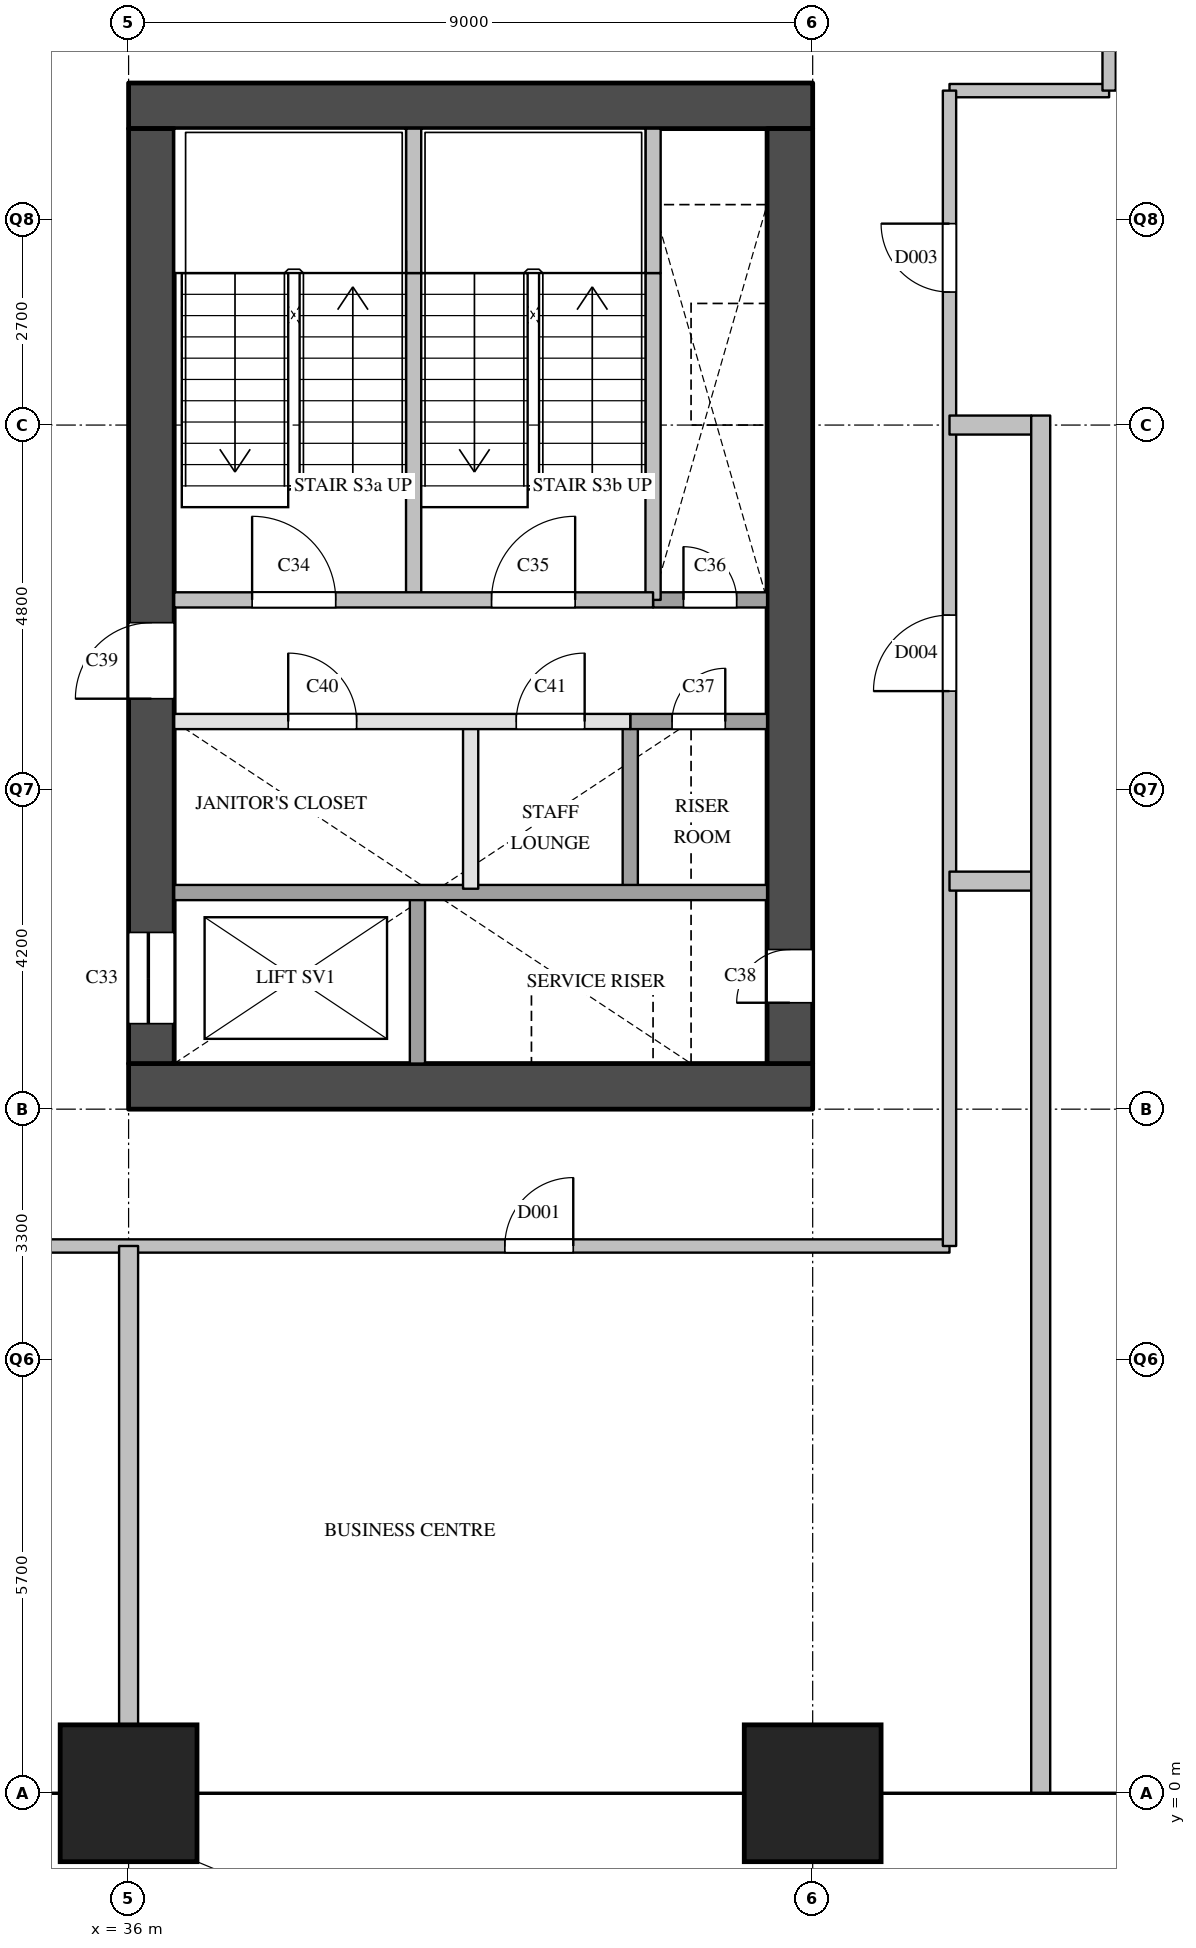
"""IFC4 building model, lengths in metres.
Left out: names, types, materials, properties, quantities, classifications, styles, units other than length and angle.
Written with IfcOpenShell. Run it as: python <this file> out.ifc"""

import sys

from ifc_helpers import new_model, si_unit, direction, frame, frame_2d, origin, origin_2d, place, context, subcontext, project, spatial, rectangle, extrude, element, fill, save


model = new_model("IFC4")
c1 = context("Model", 3, precision=1e-05, world=origin(), true_north=direction((0.0, 1.0)))
c2 = subcontext(c1, "Body", "Model", "MODEL_VIEW")
j1 = project(units=[si_unit("LENGTHUNIT", "METRE"), si_unit("PLANEANGLEUNIT", "RADIAN")], contexts=[c1])
p1 = place(None, origin())
s1 = spatial("IfcSite", under=j1, at=p1, CompositionType="ELEMENT")
p2 = place(p1, origin())
s2 = spatial("IfcBuilding", under=s1, at=p2, CompositionType="ELEMENT")
p3 = place(p2, frame((0.0, 0.0, 115.8)))
s3 = spatial("IfcBuildingStorey", under=s2, at=p3, CompositionType="ELEMENT", Elevation=115.8)
for number, where, z_axis, x_axis in (
    (1, (36.0, 0.0, 0.0), (0.0, 0.0, 1.0), (1.0, 0.0, 0.0)),
    (2, (45.0, 0.0, 0.0), (0.0, 0.0, 1.0), (1.0, 0.0, 0.0)),
):
    element("IfcColumn", number, at=place(p3, frame(where, z_axis=z_axis, x_axis=x_axis)), inside=s3, PredefinedType="COLUMN", context=c2, shape_type="SweptSolid", body=[
        extrude(rectangle(XDim=1.8, YDim=1.8, at=origin_2d()), origin(), (0.0, 0.0, 1.0), 3.8),
    ])
for number, where, z_axis, x_axis in (
    (3, (36.0, 9.3, 0.0), (0.0, 0.0, 1.0), (1.0, 0.0, 0.0)),
    (4, (36.0, 22.2, 0.0), (0.0, 0.0, 1.0), (1.0, 0.0, 0.0)),
):
    element("IfcWall", number, at=place(p3, frame(where, z_axis=z_axis, x_axis=x_axis)), inside=s3, PredefinedType="SHEAR", context=c2, shape_type="SweptSolid", body=[
        extrude(rectangle(XDim=9.0, YDim=0.6, at=frame_2d((4.5, 0.0))), origin(), (0.0, 0.0, 1.0), 3.5),
    ])
p4 = place(p3, frame((36.3, 9.6, 0.0), z_axis=(0.0, 0.0, 1.0), x_axis=(0.0, 1.0, 0.0)))
e5 = element("IfcWall", 5, at=p4, inside=s3, PredefinedType="SHEAR", context=c2, shape_type="SweptSolid", body=[
    extrude(rectangle(XDim=12.3, YDim=0.6, at=frame_2d((6.15, 0.0))), origin(), (0.0, 0.0, 1.0), 3.5),
])
p5 = place(p4, frame((0.525, 0.0, 0.0)))
e6 = element("IfcOpeningElement", 6, at=p5, cuts=e5, PredefinedType="OPENING", context=c2, shape_type="SweptSolid", body=[
    extrude(rectangle(XDim=1.2, YDim=2.1, at=frame_2d((0.6, 1.05))), frame((0.0, 0.31, 0.0), z_axis=(0.0, -1.0, 0.0), x_axis=(1.0, 0.0, 0.0)), (0.0, 0.0, 1.0), 0.62),
])
p6 = place(p4, frame((4.8, 0.0, 0.0)))
e7 = element("IfcOpeningElement", 7, at=p6, cuts=e5, PredefinedType="OPENING", context=c2, shape_type="SweptSolid", body=[
    extrude(rectangle(XDim=1.0, YDim=2.1, at=frame_2d((0.5, 1.05))), frame((0.0, 0.31, 0.0), z_axis=(0.0, -1.0, 0.0), x_axis=(1.0, 0.0, 0.0)), (0.0, 0.0, 1.0), 0.62),
])
p7 = place(p3, frame((44.7, 9.6, 0.0), z_axis=(0.0, 0.0, 1.0), x_axis=(0.0, 1.0, 0.0)))
e8 = element("IfcWall", 8, at=p7, inside=s3, PredefinedType="SHEAR", context=c2, shape_type="SweptSolid", body=[
    extrude(rectangle(XDim=12.3, YDim=0.6, at=frame_2d((6.15, 0.0))), origin(), (0.0, 0.0, 1.0), 3.5),
])
p8 = place(p7, frame((0.8, 0.0, 0.0)))
e9 = element("IfcOpeningElement", 9, at=p8, cuts=e8, PredefinedType="OPENING", context=c2, shape_type="SweptSolid", body=[
    extrude(rectangle(XDim=0.7, YDim=2.1, at=frame_2d((0.35, 1.05))), frame((0.0, 0.31, 0.0), z_axis=(0.0, -1.0, 0.0), x_axis=(1.0, 0.0, 0.0)), (0.0, 0.0, 1.0), 0.62),
])
p9 = place(p3, frame((39.75, 15.7, 0.0), z_axis=(0.0, 0.0, 1.0), x_axis=(0.0, 1.0, 0.0)))
e10 = element("IfcWall", 10, at=p9, inside=s3, PredefinedType="SOLIDWALL", context=c2, shape_type="SweptSolid", body=[
    extrude(rectangle(XDim=4.3, YDim=0.2, at=frame_2d((2.15, 0.0))), origin(), (0.0, 0.0, 1.0), 3.5),
])
p10 = place(p3, frame((39.75, 20.0, 0.0), z_axis=(0.0, 0.0, 1.0), x_axis=(0.0, 1.0, 0.0)))
e11 = element("IfcWall", 11, at=p10, inside=s3, PredefinedType="SOLIDWALL", context=c2, shape_type="SweptSolid", body=[
    extrude(rectangle(XDim=1.9, YDim=0.2, at=frame_2d((0.95, 0.0))), origin(), (0.0, 0.0, 1.0), 3.5),
])
p11 = place(p3, frame((39.8, 9.6, 0.0), z_axis=(0.0, 0.0, 1.0), x_axis=(0.0, 1.0, 0.0)))
e12 = element("IfcWall", 12, at=p11, inside=s3, PredefinedType="SOLIDWALL", context=c2, shape_type="SweptSolid", body=[
    extrude(rectangle(XDim=2.3, YDim=0.2, at=frame_2d((1.15, 0.0))), origin(), (0.0, 0.0, 1.0), 3.5),
])
p12 = place(p3, frame((40.5, 11.9, 0.0), z_axis=(0.0, 0.0, 1.0), x_axis=(0.0, 1.0, 0.0)))
e13 = element("IfcWall", 13, at=p12, inside=s3, PredefinedType="PARTITIONING", context=c2, shape_type="SweptSolid", body=[
    extrude(rectangle(XDim=2.2, YDim=0.2, at=frame_2d((1.1, 0.0))), origin(), (0.0, 0.0, 1.0), 3.5),
])
p13 = place(p3, frame((42.6, 11.9, 0.0), z_axis=(0.0, 0.0, 1.0), x_axis=(0.0, 1.0, 0.0)))
e14 = element("IfcWall", 14, at=p13, inside=s3, PredefinedType="SOLIDWALL", context=c2, shape_type="SweptSolid", body=[
    extrude(rectangle(XDim=2.2, YDim=0.2, at=frame_2d((1.1, 0.0))), origin(), (0.0, 0.0, 1.0), 3.5),
])
p14 = place(p3, frame((42.9, 15.7, 0.0), z_axis=(0.0, 0.0, 1.0), x_axis=(0.0, 1.0, 0.0)))
e15 = element("IfcWall", 15, at=p14, inside=s3, PredefinedType="SOLIDWALL", context=c2, shape_type="SweptSolid", body=[
    extrude(rectangle(XDim=4.3, YDim=0.2, at=frame_2d((2.15, 0.0))), origin(), (0.0, 0.0, 1.0), 3.5),
])
p15 = place(p3, frame((42.9, 20.0, 0.0), z_axis=(0.0, 0.0, 1.0), x_axis=(0.0, 1.0, 0.0)))
e16 = element("IfcWall", 16, at=p15, inside=s3, PredefinedType="SOLIDWALL", context=c2, shape_type="SweptSolid", body=[
    extrude(rectangle(XDim=1.9, YDim=0.2, at=frame_2d((0.95, 0.0))), origin(), (0.0, 0.0, 1.0), 3.5),
])
p16 = place(p3, frame((36.6, 11.85, 0.0), z_axis=(0.0, 0.0, 1.0), x_axis=(1.0, 0.0, 0.0)))
e17 = element("IfcWall", 17, at=p16, inside=s3, PredefinedType="SOLIDWALL", context=c2, shape_type="SweptSolid", body=[
    extrude(rectangle(XDim=7.8, YDim=0.2, at=frame_2d((3.9, 0.0))), origin(), (0.0, 0.0, 1.0), 3.5),
])
p17 = place(p3, frame((36.6, 14.1, 0.0), z_axis=(0.0, 0.0, 1.0), x_axis=(1.0, 0.0, 0.0)))
e18 = element("IfcWall", 18, at=p17, inside=s3, PredefinedType="PARTITIONING", context=c2, shape_type="SweptSolid", body=[
    extrude(rectangle(XDim=6.0, YDim=0.2, at=frame_2d((3.0, 0.0))), origin(), (0.0, 0.0, 1.0), 3.5),
])
p18 = place(p17, frame((1.5, 0.0, 0.0)))
e19 = element("IfcOpeningElement", 19, at=p18, cuts=e18, PredefinedType="OPENING", context=c2, shape_type="SweptSolid", body=[
    extrude(rectangle(XDim=0.9, YDim=2.1, at=frame_2d((0.45, 1.05))), frame((0.0, 0.11, 0.0), z_axis=(0.0, -1.0, 0.0), x_axis=(1.0, 0.0, 0.0)), (0.0, 0.0, 1.0), 0.22),
])
p19 = place(p17, frame((4.5, 0.0, 0.0)))
e20 = element("IfcOpeningElement", 20, at=p19, cuts=e18, PredefinedType="OPENING", context=c2, shape_type="SweptSolid", body=[
    extrude(rectangle(XDim=0.9, YDim=2.1, at=frame_2d((0.45, 1.05))), frame((0.0, 0.11, 0.0), z_axis=(0.0, -1.0, 0.0), x_axis=(1.0, 0.0, 0.0)), (0.0, 0.0, 1.0), 0.22),
])
p20 = place(p3, frame((42.6, 14.1, 0.0), z_axis=(0.0, 0.0, 1.0), x_axis=(1.0, 0.0, 0.0)))
e21 = element("IfcWall", 21, at=p20, inside=s3, PredefinedType="SOLIDWALL", context=c2, shape_type="SweptSolid", body=[
    extrude(rectangle(XDim=1.8, YDim=0.2, at=frame_2d((0.9, 0.0))), origin(), (0.0, 0.0, 1.0), 3.5),
])
p21 = place(p20, frame((0.55, 0.0, 0.0)))
e22 = element("IfcOpeningElement", 22, at=p21, cuts=e21, PredefinedType="OPENING", context=c2, shape_type="SweptSolid", body=[
    extrude(rectangle(XDim=0.7, YDim=2.1, at=frame_2d((0.35, 1.05))), frame((0.0, 0.11, 0.0), z_axis=(0.0, -1.0, 0.0), x_axis=(1.0, 0.0, 0.0)), (0.0, 0.0, 1.0), 0.22),
])
p22 = place(p3, frame((42.9, 15.7, 0.0), z_axis=(0.0, 0.0, 1.0), x_axis=(1.0, 0.0, 0.0)))
e23 = element("IfcWall", 23, at=p22, inside=s3, PredefinedType="SOLIDWALL", context=c2, shape_type="SweptSolid", body=[
    extrude(rectangle(XDim=1.5, YDim=0.2, at=frame_2d((0.75, 0.0))), origin(), (0.0, 0.0, 1.0), 3.5),
])
p23 = place(p22, frame((0.4, 0.0, 0.0)))
e24 = element("IfcOpeningElement", 24, at=p23, cuts=e23, PredefinedType="OPENING", context=c2, shape_type="SweptSolid", body=[
    extrude(rectangle(XDim=0.7, YDim=2.1, at=frame_2d((0.35, 1.05))), frame((0.0, 0.11, 0.0), z_axis=(0.0, -1.0, 0.0), x_axis=(1.0, 0.0, 0.0)), (0.0, 0.0, 1.0), 0.22),
])
p24 = place(p3, frame((36.6, 15.7, 0.0), z_axis=(0.0, 0.0, 1.0), x_axis=(1.0, 0.0, 0.0)))
e25 = element("IfcWall", 25, at=p24, inside=s3, PredefinedType="SOLIDWALL", context=c2, shape_type="SweptSolid", body=[
    extrude(rectangle(XDim=6.3, YDim=0.2, at=frame_2d((3.15, 0.0))), origin(), (0.0, 0.0, 1.0), 3.5),
])
p25 = place(p24, frame((1.025, 0.0, 0.0)))
e26 = element("IfcOpeningElement", 26, at=p25, cuts=e25, PredefinedType="OPENING", context=c2, shape_type="SweptSolid", body=[
    extrude(rectangle(XDim=1.1, YDim=2.1, at=frame_2d((0.55, 1.05))), frame((0.0, 0.11, 0.0), z_axis=(0.0, -1.0, 0.0), x_axis=(1.0, 0.0, 0.0)), (0.0, 0.0, 1.0), 0.22),
])
p26 = place(p24, frame((4.175, 0.0, 0.0)))
e27 = element("IfcOpeningElement", 27, at=p26, cuts=e25, PredefinedType="OPENING", context=c2, shape_type="SweptSolid", body=[
    extrude(rectangle(XDim=1.1, YDim=2.1, at=frame_2d((0.55, 1.05))), frame((0.0, 0.11, 0.0), z_axis=(0.0, -1.0, 0.0), x_axis=(1.0, 0.0, 0.0)), (0.0, 0.0, 1.0), 0.22),
])
p27 = place(p3, frame((34.2, 7.2, 0.0), z_axis=(0.0, 0.0, 1.0), x_axis=(1.0, 0.0, 0.0)))
e28 = element("IfcWall", 28, at=p27, inside=s3, PredefinedType="PARTITIONING", context=c2, shape_type="SweptSolid", body=[
    extrude(rectangle(XDim=12.6, YDim=0.175, at=frame_2d((6.3, 0.0))), origin(), (0.0, 0.0, 1.0), 3.5),
])
p28 = place(p27, frame((6.75, 0.0, 0.0)))
e29 = element("IfcOpeningElement", 29, at=p28, cuts=e28, PredefinedType="OPENING", context=c2, shape_type="SweptSolid", body=[
    extrude(rectangle(XDim=0.9, YDim=2.1, at=frame_2d((0.45, 1.05))), frame((0.0, 0.097, 0.0), z_axis=(0.0, -1.0, 0.0), x_axis=(1.0, 0.0, 0.0)), (0.0, 0.0, 1.0), 0.195),
])
p29 = place(p3, frame((46.8, 22.4, 0.0), z_axis=(0.0, 0.0, 1.0), x_axis=(1.0, 0.0, 0.0)))
e30 = element("IfcWall", 30, at=p29, inside=s3, PredefinedType="PARTITIONING", context=c2, shape_type="SweptSolid", body=[
    extrude(rectangle(XDim=2.1, YDim=0.175, at=frame_2d((1.05, 0.0))), origin(), (0.0, 0.0, 1.0), 3.5),
])
p30 = place(p3, frame((46.8, 7.2, 0.0), z_axis=(0.0, 0.0, 1.0), x_axis=(0.0, 1.0, 0.0)))
e31 = element("IfcWall", 31, at=p30, inside=s3, PredefinedType="PARTITIONING", context=c2, shape_type="SweptSolid", body=[
    extrude(rectangle(XDim=15.2, YDim=0.175, at=frame_2d((7.6, 0.0))), origin(), (0.0, 0.0, 1.0), 3.5),
])
p31 = place(p30, frame((12.55, 0.0, 0.0)))
e32 = element("IfcOpeningElement", 32, at=p31, cuts=e31, PredefinedType="OPENING", context=c2, shape_type="SweptSolid", body=[
    extrude(rectangle(XDim=0.9, YDim=2.1, at=frame_2d((0.45, 1.05))), frame((0.0, 0.097, 0.0), z_axis=(0.0, -1.0, 0.0), x_axis=(1.0, 0.0, 0.0)), (0.0, 0.0, 1.0), 0.195),
])
p32 = place(p30, frame((7.3, 0.0, 0.0)))
e33 = element("IfcOpeningElement", 33, at=p32, cuts=e31, PredefinedType="OPENING", context=c2, shape_type="SweptSolid", body=[
    extrude(rectangle(XDim=1.0, YDim=2.1, at=frame_2d((0.5, 1.05))), frame((0.0, 0.097, 0.0), z_axis=(0.0, -1.0, 0.0), x_axis=(1.0, 0.0, 0.0)), (0.0, 0.0, 1.0), 0.195),
])
p33 = place(p3, frame((48.9, 22.4, 0.0), z_axis=(0.0, 0.0, 1.0), x_axis=(0.0, 1.0, 0.0)))
e34 = element("IfcWall", 34, at=p33, inside=s3, PredefinedType="PARTITIONING", context=c2, shape_type="SweptSolid", body=[
    extrude(rectangle(XDim=4.3, YDim=0.175, at=frame_2d((2.15, 0.0))), origin(), (0.0, 0.0, 1.0), 2.5),
])
p34 = place(p3, frame((46.8, 12.0, 0.0), z_axis=(0.0, 0.0, 1.0), x_axis=(1.0, 0.0, 0.0)))
e35 = element("IfcWall", 35, at=p34, inside=s3, PredefinedType="PARTITIONING", context=c2, shape_type="SweptSolid", body=[
    extrude(rectangle(XDim=1.2, YDim=0.25, at=frame_2d((0.6, 0.0))), origin(), (0.0, 0.0, 1.0), 3.5),
])
p35 = place(p3, frame((46.8, 18.0, 0.0), z_axis=(0.0, 0.0, 1.0), x_axis=(1.0, 0.0, 0.0)))
e36 = element("IfcWall", 36, at=p35, inside=s3, PredefinedType="PARTITIONING", context=c2, shape_type="SweptSolid", body=[
    extrude(rectangle(XDim=1.075, YDim=0.25, at=frame_2d((0.538, 0.0))), origin(), (0.0, 0.0, 1.0), 3.5),
])
p36 = place(p3, frame((36.0, 0.0, 0.0), z_axis=(0.0, 0.0, 1.0), x_axis=(0.0, 1.0, 0.0)))
e37 = element("IfcWall", 37, at=p36, inside=s3, PredefinedType="PARTITIONING", context=c2, shape_type="SweptSolid", body=[
    extrude(rectangle(XDim=7.2, YDim=0.25, at=frame_2d((3.6, 0.0))), origin(), (0.0, 0.0, 1.0), 3.5),
])
p37 = place(p3, frame((48.0, 0.0, 0.0), z_axis=(0.0, 0.0, 1.0), x_axis=(0.0, 1.0, 0.0)))
e38 = element("IfcWall", 38, at=p37, inside=s3, PredefinedType="PARTITIONING", context=c2, shape_type="SweptSolid", body=[
    extrude(rectangle(XDim=18.125, YDim=0.25, at=frame_2d((9.062, 0.0))), origin(), (0.0, 0.0, 1.0), 2.5),
])
p38 = place(p5, origin())
e39 = element("IfcDoor", 39, at=p38, inside=s3, OperationType="SLIDING_TO_LEFT", PredefinedType="DOOR", context=c2, shape_type="SweptSolid", body=[
    extrude(rectangle(XDim=1.2, YDim=2.1, at=frame_2d((0.6, 1.05))), frame((0.0, 0.025, 0.0), z_axis=(0.0, -1.0, 0.0), x_axis=(1.0, 0.0, 0.0)), (0.0, 0.0, 1.0), 0.05),
])
fill(e6, e39)
p39 = place(p25, origin())
e40 = element("IfcDoor", 40, at=p39, inside=s3, OperationType="SINGLE_SWING_LEFT", PredefinedType="DOOR", context=c2, shape_type="SweptSolid", body=[
    extrude(rectangle(XDim=1.1, YDim=2.1, at=frame_2d((0.55, 1.05))), frame((0.0, 0.025, 0.0), z_axis=(0.0, -1.0, 0.0), x_axis=(1.0, 0.0, 0.0)), (0.0, 0.0, 1.0), 0.05),
])
fill(e26, e40)
p40 = place(p26, origin())
e41 = element("IfcDoor", 41, at=p40, inside=s3, OperationType="SINGLE_SWING_RIGHT", PredefinedType="DOOR", context=c2, shape_type="SweptSolid", body=[
    extrude(rectangle(XDim=1.1, YDim=2.1, at=frame_2d((0.55, 1.05))), frame((0.0, 0.025, 0.0), z_axis=(0.0, -1.0, 0.0), x_axis=(1.0, 0.0, 0.0)), (0.0, 0.0, 1.0), 0.05),
])
fill(e27, e41)
p41 = place(p23, origin())
e42 = element("IfcDoor", 42, at=p41, inside=s3, OperationType="SINGLE_SWING_LEFT", PredefinedType="DOOR", context=c2, shape_type="SweptSolid", body=[
    extrude(rectangle(XDim=0.7, YDim=2.1, at=frame_2d((0.35, 1.05))), frame((0.0, 0.025, 0.0), z_axis=(0.0, -1.0, 0.0), x_axis=(1.0, 0.0, 0.0)), (0.0, 0.0, 1.0), 0.05),
])
fill(e24, e42)
p42 = place(p21, origin())
e43 = element("IfcDoor", 43, at=p42, inside=s3, OperationType="SINGLE_SWING_RIGHT", PredefinedType="DOOR", context=c2, shape_type="SweptSolid", body=[
    extrude(rectangle(XDim=0.7, YDim=2.1, at=frame_2d((0.35, 1.05))), frame((0.0, 0.025, 0.0), z_axis=(0.0, -1.0, 0.0), x_axis=(1.0, 0.0, 0.0)), (0.0, 0.0, 1.0), 0.05),
])
fill(e22, e43)
p43 = place(p8, origin())
e44 = element("IfcDoor", 44, at=p43, inside=s3, OperationType="SINGLE_SWING_LEFT", PredefinedType="DOOR", context=c2, shape_type="SweptSolid", body=[
    extrude(rectangle(XDim=0.7, YDim=2.1, at=frame_2d((0.35, 1.05))), frame((0.0, 0.025, 0.0), z_axis=(0.0, -1.0, 0.0), x_axis=(1.0, 0.0, 0.0)), (0.0, 0.0, 1.0), 0.05),
])
fill(e9, e44)
p44 = place(p6, origin())
e45 = element("IfcDoor", 45, at=p44, inside=s3, OperationType="SINGLE_SWING_LEFT", PredefinedType="DOOR", context=c2, shape_type="SweptSolid", body=[
    extrude(rectangle(XDim=1.0, YDim=2.1, at=frame_2d((0.5, 1.05))), frame((0.0, 0.025, 0.0), z_axis=(0.0, -1.0, 0.0), x_axis=(1.0, 0.0, 0.0)), (0.0, 0.0, 1.0), 0.05),
])
fill(e7, e45)
p45 = place(p18, origin())
e46 = element("IfcDoor", 46, at=p45, inside=s3, OperationType="SINGLE_SWING_LEFT", PredefinedType="DOOR", context=c2, shape_type="SweptSolid", body=[
    extrude(rectangle(XDim=0.9, YDim=2.1, at=frame_2d((0.45, 1.05))), frame((0.0, 0.025, 0.0), z_axis=(0.0, -1.0, 0.0), x_axis=(1.0, 0.0, 0.0)), (0.0, 0.0, 1.0), 0.05),
])
fill(e19, e46)
p46 = place(p19, origin())
e47 = element("IfcDoor", 47, at=p46, inside=s3, OperationType="SINGLE_SWING_RIGHT", PredefinedType="DOOR", context=c2, shape_type="SweptSolid", body=[
    extrude(rectangle(XDim=0.9, YDim=2.1, at=frame_2d((0.45, 1.05))), frame((0.0, 0.025, 0.0), z_axis=(0.0, -1.0, 0.0), x_axis=(1.0, 0.0, 0.0)), (0.0, 0.0, 1.0), 0.05),
])
fill(e20, e47)
p47 = place(p28, origin())
e48 = element("IfcDoor", 48, at=p47, inside=s3, OperationType="SINGLE_SWING_RIGHT", PredefinedType="DOOR", context=c2, shape_type="SweptSolid", body=[
    extrude(rectangle(XDim=0.9, YDim=2.1, at=frame_2d((0.45, 1.05))), frame((0.0, 0.025, 0.0), z_axis=(0.0, -1.0, 0.0), x_axis=(1.0, 0.0, 0.0)), (0.0, 0.0, 1.0), 0.05),
])
fill(e29, e48)
p48 = place(p31, origin())
e49 = element("IfcDoor", 49, at=p48, inside=s3, OperationType="SINGLE_SWING_RIGHT", PredefinedType="DOOR", context=c2, shape_type="SweptSolid", body=[
    extrude(rectangle(XDim=0.9, YDim=2.1, at=frame_2d((0.45, 1.05))), frame((0.0, 0.025, 0.0), z_axis=(0.0, -1.0, 0.0), x_axis=(1.0, 0.0, 0.0)), (0.0, 0.0, 1.0), 0.05),
])
fill(e32, e49)
p49 = place(p32, origin())
e50 = element("IfcDoor", 50, at=p49, inside=s3, OperationType="SINGLE_SWING_LEFT", PredefinedType="DOOR", context=c2, shape_type="SweptSolid", body=[
    extrude(rectangle(XDim=1.0, YDim=2.1, at=frame_2d((0.5, 1.05))), frame((0.0, 0.025, 0.0), z_axis=(0.0, -1.0, 0.0), x_axis=(1.0, 0.0, 0.0)), (0.0, 0.0, 1.0), 0.05),
])
fill(e33, e50)
save(model, sys.argv[1])
